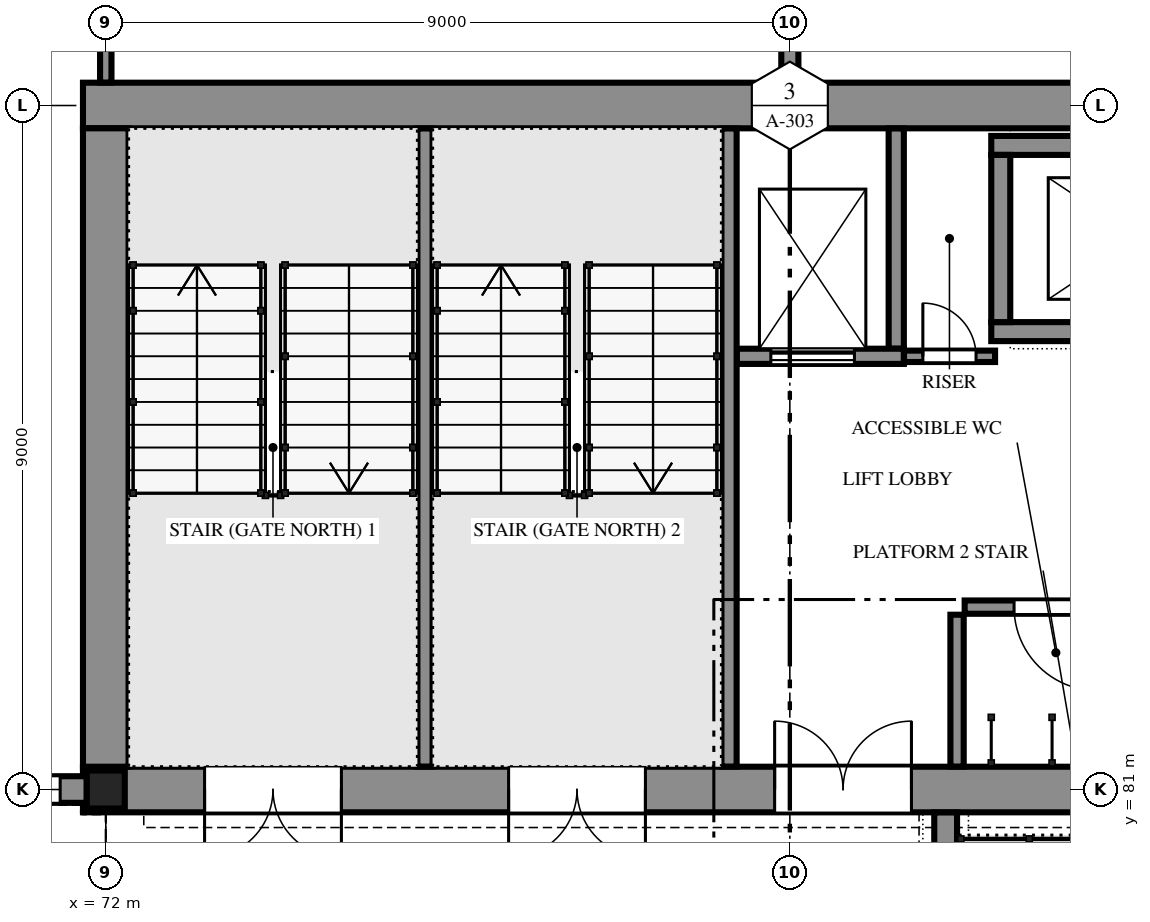
"""IFC4 building model, lengths in metres.
Left out: names, types, materials, properties, quantities, classifications, styles, units other than length and angle.
Written with IfcOpenShell. Run it as: python <this file> out.ifc"""

import sys

from ifc_helpers import new_model, si_unit, direction, frame, frame_2d, origin, origin_2d, place, context, subcontext, project, spatial, polyline, rectangle, hollow_rectangle, outline, extrude, element, fill, save


model = new_model("IFC4")
c1 = context("Model", 3, precision=1e-05, world=origin(), true_north=direction((0.0, 1.0)))
c2 = subcontext(c1, "Body", "Model", "MODEL_VIEW")
j1 = project(units=[si_unit("LENGTHUNIT", "METRE"), si_unit("PLANEANGLEUNIT", "RADIAN")], contexts=[c1])
p1 = place(None, origin())
s1 = spatial("IfcSite", under=j1, at=p1, CompositionType="ELEMENT")
p2 = place(p1, origin())
s2 = spatial("IfcBuilding", under=s1, at=p2, CompositionType="ELEMENT")
p3 = place(p2, origin())
s3 = spatial("IfcBuildingStorey", under=s2, at=p3, CompositionType="ELEMENT", Elevation=0.0)
p4 = place(p3, frame((72.0, 81.0, -2.1), z_axis=(0.0, 0.0, 1.0), x_axis=(1.0, 0.0, 0.0)))
e1 = element("IfcColumn", 1, at=p4, inside=s3, PredefinedType="COLUMN", context=c2, shape_type="SweptSolid", body=[
    extrude(hollow_rectangle(XDim=0.5, YDim=0.5, WallThickness=0.032, at=origin_2d()), origin(), (0.0, 0.0, 1.0), 9.6),
])
p5 = place(p3, frame((71.7, 81.0, -2.1), z_axis=(0.0, 0.0, 1.0), x_axis=(1.0, 0.0, 0.0)))
e2 = element("IfcWall", 2, at=p5, inside=s3, PredefinedType="SOLIDWALL", context=c2, shape_type="SweptSolid", body=[
    extrude(rectangle(XDim=18.6, YDim=0.6, at=frame_2d((9.3, 0.0))), origin(), (0.0, 0.0, 1.0), 9.6),
])
p6 = place(p5, frame((1.6, 0.0, 2.1)))
e3 = element("IfcOpeningElement", 3, at=p6, cuts=e2, PredefinedType="OPENING", context=c2, shape_type="SweptSolid", body=[
    extrude(rectangle(XDim=1.8, YDim=2.1, at=frame_2d((0.9, 1.05))), frame((0.0, 0.31, 0.0), z_axis=(0.0, -1.0, 0.0), x_axis=(1.0, 0.0, 0.0)), (0.0, 0.0, 1.0), 0.62),
])
p7 = place(p5, frame((5.6, 0.0, 2.1)))
e4 = element("IfcOpeningElement", 4, at=p7, cuts=e2, PredefinedType="OPENING", context=c2, shape_type="SweptSolid", body=[
    extrude(rectangle(XDim=1.8, YDim=2.1, at=frame_2d((0.9, 1.05))), frame((0.0, 0.31, 0.0), z_axis=(0.0, -1.0, 0.0), x_axis=(1.0, 0.0, 0.0)), (0.0, 0.0, 1.0), 0.62),
])
p8 = place(p5, frame((9.1, 0.0, 2.1)))
e5 = element("IfcOpeningElement", 5, at=p8, cuts=e2, PredefinedType="OPENING", context=c2, shape_type="SweptSolid", body=[
    extrude(rectangle(XDim=1.8, YDim=2.1, at=frame_2d((0.9, 1.05))), frame((0.0, 0.31, 0.0), z_axis=(0.0, -1.0, 0.0), x_axis=(1.0, 0.0, 0.0)), (0.0, 0.0, 1.0), 0.62),
])
p9 = place(p3, frame((71.7, 90.0, -2.1), z_axis=(0.0, 0.0, 1.0), x_axis=(1.0, 0.0, 0.0)))
e6 = element("IfcWall", 6, at=p9, inside=s3, PredefinedType="SOLIDWALL", context=c2, shape_type="SweptSolid", body=[
    extrude(rectangle(XDim=18.6, YDim=0.6, at=frame_2d((9.3, 0.0))), origin(), (0.0, 0.0, 1.0), 9.6),
])
p10 = place(p3, frame((72.0, 81.3, -2.1), z_axis=(0.0, 0.0, 1.0), x_axis=(0.0, 1.0, 0.0)))
e7 = element("IfcWall", 7, at=p10, inside=s3, PredefinedType="SOLIDWALL", context=c2, shape_type="SweptSolid", body=[
    extrude(rectangle(XDim=8.4, YDim=0.6, at=frame_2d((4.2, 0.0))), origin(), (0.0, 0.0, 1.0), 9.6),
])
p11 = place(p3, frame((63.154, 81.0, 0.0), z_axis=(0.0, 0.0, 1.0), x_axis=(1.0, 0.0, 0.0)))
e8 = element("IfcWall", 8, at=p11, inside=s3, PredefinedType="SOLIDWALL", context=c2, shape_type="SweptSolid", body=[
    extrude(rectangle(XDim=8.596, YDim=0.35, at=frame_2d((4.298, 0.0))), origin(), (0.0, 0.0, 1.0), 6.692),
])
p12 = place(p11, frame((0.446, 0.0, 0.9)))
e9 = element("IfcOpeningElement", 9, at=p12, cuts=e8, PredefinedType="OPENING", context=c2, shape_type="SweptSolid", body=[
    extrude(rectangle(XDim=1.8, YDim=3.6, at=frame_2d((0.9, 1.8))), frame((0.0, 0.185, 0.0), z_axis=(0.0, -1.0, 0.0), x_axis=(1.0, 0.0, 0.0)), (0.0, 0.0, 1.0), 0.37),
])
p13 = place(p11, frame((3.446, 0.0, 0.9)))
e10 = element("IfcOpeningElement", 10, at=p13, cuts=e8, PredefinedType="OPENING", context=c2, shape_type="SweptSolid", body=[
    extrude(rectangle(XDim=1.8, YDim=3.6, at=frame_2d((0.9, 1.8))), frame((0.0, 0.185, 0.0), z_axis=(0.0, -1.0, 0.0), x_axis=(1.0, 0.0, 0.0)), (0.0, 0.0, 1.0), 0.37),
])
p14 = place(p11, frame((6.446, 0.0, 0.9)))
e11 = element("IfcOpeningElement", 11, at=p14, cuts=e8, PredefinedType="OPENING", context=c2, shape_type="SweptSolid", body=[
    extrude(rectangle(XDim=1.8, YDim=3.6, at=frame_2d((0.9, 1.8))), frame((0.0, 0.185, 0.0), z_axis=(0.0, -1.0, 0.0), x_axis=(1.0, 0.0, 0.0)), (0.0, 0.0, 1.0), 0.37),
])
for number, where, z_axis, x_axis in (
    (12, (76.2, 81.302, 0.0), (0.0, 0.0, 1.0), (0.0, 1.0, 0.0)),
    (13, (80.2, 81.302, 0.0), (0.0, 0.0, 1.0), (0.0, 1.0, 0.0)),
):
    element("IfcWall", number, at=place(p3, frame(where, z_axis=z_axis, x_axis=x_axis)), inside=s3, PredefinedType="SOLIDWALL", context=c2, shape_type="SweptSolid", body=[
        extrude(rectangle(XDim=8.396, YDim=0.2, at=frame_2d((4.198, 0.0))), origin(), (0.0, 0.0, 1.0), 6.836),
    ])
p15 = place(p3, frame((83.05, 72.6, 0.0), z_axis=(0.0, 0.0, 1.0), x_axis=(0.0, 1.0, 0.0)))
e14 = element("IfcWall", 14, at=p15, inside=s3, PredefinedType="SOLIDWALL", context=c2, shape_type="SweptSolid", body=[
    extrude(rectangle(XDim=8.098, YDim=0.3, at=frame_2d((4.049, 0.0))), origin(), (0.0, 0.0, 1.0), 6.902),
])
p16 = place(p3, frame((80.302, 86.7, -1.6), z_axis=(0.0, 0.0, 1.0), x_axis=(1.0, 0.0, 0.0)))
e15 = element("IfcWall", 15, at=p16, inside=s3, PredefinedType="SOLIDWALL", context=c2, shape_type="SweptSolid", body=[
    extrude(rectangle(XDim=2.198, YDim=0.2, at=frame_2d((1.099, 0.0))), origin(), (0.0, 0.0, 1.0), 8.357),
])
p17 = place(p16, frame((0.448, 0.0, 1.6)))
e16 = element("IfcOpeningElement", 16, at=p17, cuts=e15, PredefinedType="OPENING", context=c2, shape_type="SweptSolid", body=[
    extrude(rectangle(XDim=1.1, YDim=2.1, at=frame_2d((0.55, 1.05))), frame((0.0, 0.11, 0.0), z_axis=(0.0, -1.0, 0.0), x_axis=(1.0, 0.0, 0.0)), (0.0, 0.0, 1.0), 0.22),
])
p18 = place(p3, frame((82.4, 86.8, -1.6), z_axis=(0.0, 0.0, 1.0), x_axis=(0.0, 1.0, 0.0)))
e17 = element("IfcWall", 17, at=p18, inside=s3, PredefinedType="SOLIDWALL", context=c2, shape_type="SweptSolid", body=[
    extrude(rectangle(XDim=2.898, YDim=0.2, at=frame_2d((1.449, 0.0))), origin(), (0.0, 0.0, 1.0), 8.357),
])
for number, where, z_axis, x_axis in (
    (18, (83.65, 87.025, -1.6), (0.0, 0.0, 1.0), (1.0, 0.0, 0.0)),
    (19, (83.65, 89.475, -1.6), (0.0, 0.0, 1.0), (1.0, 0.0, 0.0)),
):
    element("IfcWall", number, at=place(p3, frame(where, z_axis=z_axis, x_axis=x_axis)), inside=s3, PredefinedType="SOLIDWALL", context=c2, shape_type="SweptSolid", body=[
        extrude(rectangle(XDim=3.4, YDim=0.25, at=frame_2d((1.7, 0.0))), origin(), (0.0, 0.0, 1.0), 8.436),
    ])
p19 = place(p3, frame((83.775, 87.15, -1.6), z_axis=(0.0, 0.0, 1.0), x_axis=(0.0, 1.0, 0.0)))
e20 = element("IfcWall", 20, at=p19, inside=s3, PredefinedType="SOLIDWALL", context=c2, shape_type="SweptSolid", body=[
    extrude(rectangle(XDim=2.2, YDim=0.25, at=frame_2d((1.1, 0.0))), origin(), (0.0, 0.0, 1.0), 8.436),
])
p20 = place(p3, frame((72.0, 95.938, 0.0), z_axis=(0.0, 0.0, 1.0), x_axis=(0.0, -1.0, 0.0)))
e21 = element("IfcWall", 21, at=p20, inside=s3, PredefinedType="PARTITIONING", context=c2, shape_type="SweptSolid", body=[
    extrude(rectangle(XDim=5.635, YDim=0.15, at=frame_2d((2.818, 0.0))), origin(), (0.0, 0.0, 1.0), 6.6),
])
p21 = place(p3, frame((81.0, 95.887, 0.0), z_axis=(0.0, 0.0, 1.0), x_axis=(0.0, -1.0, 0.0)))
e22 = element("IfcWall", 22, at=p21, inside=s3, PredefinedType="PARTITIONING", context=c2, shape_type="SweptSolid", body=[
    extrude(rectangle(XDim=5.585, YDim=0.225, at=frame_2d((2.793, 0.0))), origin(), (0.0, 0.0, 1.0), 6.6),
])
p22 = place(p3, frame((85.7, 83.4, 0.0), z_axis=(0.0, 0.0, 1.0), x_axis=(-1.0, 0.0, 0.0)))
e23 = element("IfcWall", 23, at=p22, inside=s3, PredefinedType="PARTITIONING", context=c2, shape_type="SweptSolid", body=[
    extrude(rectangle(XDim=2.4, YDim=0.175, at=frame_2d((1.2, 0.0))), origin(), (0.0, 0.0, 1.0), 6.459),
])
p23 = place(p22, frame((0.65, 0.0, 0.0)))
e24 = element("IfcOpeningElement", 24, at=p23, cuts=e23, PredefinedType="OPENING", context=c2, shape_type="SweptSolid", body=[
    extrude(rectangle(XDim=1.1, YDim=2.1, at=frame_2d((0.55, 1.05))), frame((0.0, 0.097, 0.0), z_axis=(0.0, -1.0, 0.0), x_axis=(1.0, 0.0, 0.0)), (0.0, 0.0, 1.0), 0.195),
])
p24 = place(p3, frame((83.2, 83.3, 0.0), z_axis=(0.0, 0.0, 1.0), x_axis=(0.0, -1.0, 0.0)))
e25 = element("IfcWall", 25, at=p24, inside=s3, PredefinedType="PARTITIONING", context=c2, shape_type="SweptSolid", body=[
    extrude(rectangle(XDim=1.998, YDim=0.175, at=frame_2d((0.999, 0.0))), origin(), (0.0, 0.0, 1.0), 6.459),
])
p25 = place(p3, frame((82.502, 86.7, 0.0), z_axis=(0.0, 0.0, 1.0), x_axis=(1.0, 0.0, 0.0)))
e26 = element("IfcWall", 26, at=p25, inside=s3, PredefinedType="SOLIDWALL", context=c2, shape_type="SweptSolid", body=[
    extrude(rectangle(XDim=1.198, YDim=0.15, at=frame_2d((0.599, 0.0))), origin(), (0.0, 0.0, 1.0), 6.836),
])
p26 = place(p25, frame((0.248, 0.0, 0.0)))
e27 = element("IfcOpeningElement", 27, at=p26, cuts=e26, PredefinedType="OPENING", context=c2, shape_type="SweptSolid", body=[
    extrude(rectangle(XDim=0.7, YDim=2.0, at=frame_2d((0.35, 1.0))), frame((0.0, 0.085, 0.0), z_axis=(0.0, -1.0, 0.0), x_axis=(1.0, 0.0, 0.0)), (0.0, 0.0, 1.0), 0.17),
])
p27 = place(p14, origin())
e28 = element("IfcWindow", 28, at=p27, inside=s3, PartitioningType="TRIPLE_PANEL_HORIZONTAL", PredefinedType="WINDOW", context=c2, shape_type="SweptSolid", body=[
    extrude(outline(polyline([(0.0, 0.0), (1.8, 0.0), (1.8, 3.6), (0.0, 3.6), (0.0, 0.0)]), holes=[polyline([(0.07, 0.07), (1.73, 0.07), (1.73, 3.53), (0.07, 3.53), (0.07, 0.07)])]), frame((0.0, 0.03, 0.0), z_axis=(0.0, -1.0, 0.0), x_axis=(1.0, 0.0, 0.0)), (0.0, 0.0, 1.0), 0.06),
    extrude(rectangle(XDim=1.66, YDim=0.04, at=frame_2d((0.9, 1.217))), frame((0.0, 0.021, 0.0), z_axis=(0.0, -1.0, 0.0), x_axis=(1.0, 0.0, 0.0)), (0.0, 0.0, 1.0), 0.043),
    extrude(rectangle(XDim=1.66, YDim=0.04, at=frame_2d((0.9, 2.383))), frame((0.0, 0.021, 0.0), z_axis=(0.0, -1.0, 0.0), x_axis=(1.0, 0.0, 0.0)), (0.0, 0.0, 1.0), 0.043),
    extrude(outline(polyline([(0.07, 0.07), (1.73, 0.07), (1.73, 1.197), (0.07, 1.197), (0.07, 0.07)]), holes=[polyline([(0.1, 0.1), (1.7, 0.1), (1.7, 1.167), (0.1, 1.167), (0.1, 0.1)])]), frame((0.0, 0.022, 0.0), z_axis=(0.0, -1.0, 0.0), x_axis=(1.0, 0.0, 0.0)), (0.0, 0.0, 1.0), 0.045),
    extrude(rectangle(XDim=1.6, YDim=1.067, at=frame_2d((0.9, 0.633))), frame((0.0, 0.006, 0.0), z_axis=(0.0, -1.0, 0.0), x_axis=(1.0, 0.0, 0.0)), (0.0, 0.0, 1.0), 0.012),
    extrude(outline(polyline([(0.07, 1.237), (1.73, 1.237), (1.73, 2.363), (0.07, 2.363), (0.07, 1.237)]), holes=[polyline([(0.1, 1.267), (1.7, 1.267), (1.7, 2.333), (0.1, 2.333), (0.1, 1.267)])]), frame((0.0, 0.022, 0.0), z_axis=(0.0, -1.0, 0.0), x_axis=(1.0, 0.0, 0.0)), (0.0, 0.0, 1.0), 0.045),
    extrude(rectangle(XDim=1.6, YDim=1.066, at=frame_2d((0.9, 1.8))), frame((0.0, 0.006, 0.0), z_axis=(0.0, -1.0, 0.0), x_axis=(1.0, 0.0, 0.0)), (0.0, 0.0, 1.0), 0.012),
    extrude(outline(polyline([(0.07, 2.403), (1.73, 2.403), (1.73, 3.53), (0.07, 3.53), (0.07, 2.403)]), holes=[polyline([(0.1, 2.433), (1.7, 2.433), (1.7, 3.5), (0.1, 3.5), (0.1, 2.433)])]), frame((0.0, 0.022, 0.0), z_axis=(0.0, -1.0, 0.0), x_axis=(1.0, 0.0, 0.0)), (0.0, 0.0, 1.0), 0.045),
    extrude(rectangle(XDim=1.6, YDim=1.067, at=frame_2d((0.9, 2.967))), frame((0.0, 0.006, 0.0), z_axis=(0.0, -1.0, 0.0), x_axis=(1.0, 0.0, 0.0)), (0.0, 0.0, 1.0), 0.012),
])
fill(e11, e28)
p28 = place(p17, origin())
e29 = element("IfcDoor", 29, at=p28, inside=s3, OperationType="SLIDING_TO_LEFT", PredefinedType="DOOR", context=c2, shape_type="SweptSolid", body=[
    extrude(outline(polyline([(0.0, 0.0), (0.07, 0.0), (0.07, 2.03), (1.03, 2.03), (1.03, 0.0), (1.1, 0.0), (1.1, 2.1), (0.0, 2.1), (0.0, 0.0)])), frame((0.0, 0.025, 0.0), z_axis=(0.0, -1.0, 0.0), x_axis=(1.0, 0.0, 0.0)), (0.0, 0.0, 1.0), 0.05),
    extrude(rectangle(XDim=0.524, YDim=2.016, at=frame_2d((0.336, 1.018))), frame((0.0, 0.018, 0.0), z_axis=(0.0, -1.0, 0.0), x_axis=(1.0, 0.0, 0.0)), (0.0, 0.0, 1.0), 0.016),
    extrude(rectangle(XDim=0.52, YDim=2.016, at=frame_2d((0.766, 1.018))), frame((0.0, -0.002, 0.0), z_axis=(0.0, -1.0, 0.0), x_axis=(1.0, 0.0, 0.0)), (0.0, 0.0, 1.0), 0.016),
])
fill(e16, e29)
p29 = place(p6, frame((1.8, 0.0, 0.0), z_axis=(0.0, 0.0, 1.0), x_axis=(-1.0, 0.0, 0.0)))
e30 = element("IfcDoor", 30, at=p29, inside=s3, OperationType="DOUBLE_DOOR_SINGLE_SWING", PredefinedType="DOOR", context=c2, shape_type="SweptSolid", body=[
    extrude(outline(polyline([(0.0, 0.0), (0.07, 0.0), (0.07, 2.03), (1.73, 2.03), (1.73, 0.0), (1.8, 0.0), (1.8, 2.1), (0.0, 2.1), (0.0, 0.0)])), frame((0.0, 0.025, 0.0), z_axis=(0.0, -1.0, 0.0), x_axis=(1.0, 0.0, 0.0)), (0.0, 0.0, 1.0), 0.05),
    extrude(outline(polyline([(0.074, 0.01), (0.897, 0.01), (0.897, 2.026), (0.074, 2.026), (0.074, 0.01)]), holes=[polyline([(0.194, 0.16), (0.777, 0.16), (0.777, 1.01), (0.194, 1.01), (0.194, 0.16)]), polyline([(0.335, 1.16), (0.635, 1.16), (0.635, 1.76), (0.335, 1.76), (0.335, 1.16)])]), frame((0.0, 0.017, 0.0), z_axis=(0.0, -1.0, 0.0), x_axis=(1.0, 0.0, 0.0)), (0.0, 0.0, 1.0), 0.035),
    extrude(rectangle(XDim=0.583, YDim=0.85, at=frame_2d((0.485, 0.585))), frame((0.0, 0.009, 0.0), z_axis=(0.0, -1.0, 0.0), x_axis=(1.0, 0.0, 0.0)), (0.0, 0.0, 1.0), 0.017),
    extrude(rectangle(XDim=0.3, YDim=0.6, at=frame_2d((0.485, 1.46))), frame((0.0, 0.006, 0.0), z_axis=(0.0, -1.0, 0.0), x_axis=(1.0, 0.0, 0.0)), (0.0, 0.0, 1.0), 0.012),
    extrude(outline(polyline([(0.903, 0.01), (1.726, 0.01), (1.726, 2.026), (0.903, 2.026), (0.903, 0.01)]), holes=[polyline([(1.023, 0.16), (1.606, 0.16), (1.606, 1.01), (1.023, 1.01), (1.023, 0.16)]), polyline([(1.165, 1.16), (1.465, 1.16), (1.465, 1.76), (1.165, 1.76), (1.165, 1.16)])]), frame((0.0, 0.017, 0.0), z_axis=(0.0, -1.0, 0.0), x_axis=(1.0, 0.0, 0.0)), (0.0, 0.0, 1.0), 0.035),
    extrude(rectangle(XDim=0.583, YDim=0.85, at=frame_2d((1.314, 0.585))), frame((0.0, 0.009, 0.0), z_axis=(0.0, -1.0, 0.0), x_axis=(1.0, 0.0, 0.0)), (0.0, 0.0, 1.0), 0.017),
    extrude(rectangle(XDim=0.3, YDim=0.6, at=frame_2d((1.314, 1.46))), frame((0.0, 0.006, 0.0), z_axis=(0.0, -1.0, 0.0), x_axis=(1.0, 0.0, 0.0)), (0.0, 0.0, 1.0), 0.012),
])
fill(e3, e30)
p30 = place(p7, frame((1.8, 0.0, 0.0), z_axis=(0.0, 0.0, 1.0), x_axis=(-1.0, 0.0, 0.0)))
e31 = element("IfcDoor", 31, at=p30, inside=s3, OperationType="DOUBLE_DOOR_SINGLE_SWING", PredefinedType="DOOR", context=c2, shape_type="SweptSolid", body=[
    extrude(outline(polyline([(0.0, 0.0), (0.07, 0.0), (0.07, 2.03), (1.73, 2.03), (1.73, 0.0), (1.8, 0.0), (1.8, 2.1), (0.0, 2.1), (0.0, 0.0)])), frame((0.0, 0.025, 0.0), z_axis=(0.0, -1.0, 0.0), x_axis=(1.0, 0.0, 0.0)), (0.0, 0.0, 1.0), 0.05),
    extrude(outline(polyline([(0.074, 0.01), (0.897, 0.01), (0.897, 2.026), (0.074, 2.026), (0.074, 0.01)]), holes=[polyline([(0.194, 0.16), (0.777, 0.16), (0.777, 1.01), (0.194, 1.01), (0.194, 0.16)]), polyline([(0.335, 1.16), (0.635, 1.16), (0.635, 1.76), (0.335, 1.76), (0.335, 1.16)])]), frame((0.0, 0.017, 0.0), z_axis=(0.0, -1.0, 0.0), x_axis=(1.0, 0.0, 0.0)), (0.0, 0.0, 1.0), 0.035),
    extrude(rectangle(XDim=0.583, YDim=0.85, at=frame_2d((0.485, 0.585))), frame((0.0, 0.009, 0.0), z_axis=(0.0, -1.0, 0.0), x_axis=(1.0, 0.0, 0.0)), (0.0, 0.0, 1.0), 0.017),
    extrude(rectangle(XDim=0.3, YDim=0.6, at=frame_2d((0.485, 1.46))), frame((0.0, 0.006, 0.0), z_axis=(0.0, -1.0, 0.0), x_axis=(1.0, 0.0, 0.0)), (0.0, 0.0, 1.0), 0.012),
    extrude(outline(polyline([(0.903, 0.01), (1.726, 0.01), (1.726, 2.026), (0.903, 2.026), (0.903, 0.01)]), holes=[polyline([(1.023, 0.16), (1.606, 0.16), (1.606, 1.01), (1.023, 1.01), (1.023, 0.16)]), polyline([(1.165, 1.16), (1.465, 1.16), (1.465, 1.76), (1.165, 1.76), (1.165, 1.16)])]), frame((0.0, 0.017, 0.0), z_axis=(0.0, -1.0, 0.0), x_axis=(1.0, 0.0, 0.0)), (0.0, 0.0, 1.0), 0.035),
    extrude(rectangle(XDim=0.583, YDim=0.85, at=frame_2d((1.314, 0.585))), frame((0.0, 0.009, 0.0), z_axis=(0.0, -1.0, 0.0), x_axis=(1.0, 0.0, 0.0)), (0.0, 0.0, 1.0), 0.017),
    extrude(rectangle(XDim=0.3, YDim=0.6, at=frame_2d((1.314, 1.46))), frame((0.0, 0.006, 0.0), z_axis=(0.0, -1.0, 0.0), x_axis=(1.0, 0.0, 0.0)), (0.0, 0.0, 1.0), 0.012),
])
fill(e4, e31)
p31 = place(p8, origin())
e32 = element("IfcDoor", 32, at=p31, inside=s3, OperationType="DOUBLE_DOOR_SINGLE_SWING", PredefinedType="DOOR", context=c2, shape_type="SweptSolid", body=[
    extrude(outline(polyline([(0.0, 0.0), (0.07, 0.0), (0.07, 2.03), (1.73, 2.03), (1.73, 0.0), (1.8, 0.0), (1.8, 2.1), (0.0, 2.1), (0.0, 0.0)])), frame((0.0, 0.025, 0.0), z_axis=(0.0, -1.0, 0.0), x_axis=(1.0, 0.0, 0.0)), (0.0, 0.0, 1.0), 0.05),
    extrude(outline(polyline([(0.074, 0.01), (0.897, 0.01), (0.897, 2.026), (0.074, 2.026), (0.074, 0.01)]), holes=[polyline([(0.194, 0.16), (0.777, 0.16), (0.777, 1.01), (0.194, 1.01), (0.194, 0.16)]), polyline([(0.335, 1.16), (0.635, 1.16), (0.635, 1.76), (0.335, 1.76), (0.335, 1.16)])]), frame((0.0, 0.017, 0.0), z_axis=(0.0, -1.0, 0.0), x_axis=(1.0, 0.0, 0.0)), (0.0, 0.0, 1.0), 0.035),
    extrude(rectangle(XDim=0.583, YDim=0.85, at=frame_2d((0.485, 0.585))), frame((0.0, 0.009, 0.0), z_axis=(0.0, -1.0, 0.0), x_axis=(1.0, 0.0, 0.0)), (0.0, 0.0, 1.0), 0.017),
    extrude(rectangle(XDim=0.3, YDim=0.6, at=frame_2d((0.485, 1.46))), frame((0.0, 0.006, 0.0), z_axis=(0.0, -1.0, 0.0), x_axis=(1.0, 0.0, 0.0)), (0.0, 0.0, 1.0), 0.012),
    extrude(outline(polyline([(0.903, 0.01), (1.726, 0.01), (1.726, 2.026), (0.903, 2.026), (0.903, 0.01)]), holes=[polyline([(1.023, 0.16), (1.606, 0.16), (1.606, 1.01), (1.023, 1.01), (1.023, 0.16)]), polyline([(1.165, 1.16), (1.465, 1.16), (1.465, 1.76), (1.165, 1.76), (1.165, 1.16)])]), frame((0.0, 0.017, 0.0), z_axis=(0.0, -1.0, 0.0), x_axis=(1.0, 0.0, 0.0)), (0.0, 0.0, 1.0), 0.035),
    extrude(rectangle(XDim=0.583, YDim=0.85, at=frame_2d((1.314, 0.585))), frame((0.0, 0.009, 0.0), z_axis=(0.0, -1.0, 0.0), x_axis=(1.0, 0.0, 0.0)), (0.0, 0.0, 1.0), 0.017),
    extrude(rectangle(XDim=0.3, YDim=0.6, at=frame_2d((1.314, 1.46))), frame((0.0, 0.006, 0.0), z_axis=(0.0, -1.0, 0.0), x_axis=(1.0, 0.0, 0.0)), (0.0, 0.0, 1.0), 0.012),
])
fill(e5, e32)
p32 = place(p26, origin())
e33 = element("IfcDoor", 33, at=p32, inside=s3, OperationType="SINGLE_SWING_LEFT", PredefinedType="DOOR", context=c2, shape_type="SweptSolid", body=[
    extrude(outline(polyline([(0.0, 0.0), (0.07, 0.0), (0.07, 1.93), (0.63, 1.93), (0.63, 0.0), (0.7, 0.0), (0.7, 2.0), (0.0, 2.0), (0.0, 0.0)])), frame((0.0, 0.025, 0.0), z_axis=(0.0, -1.0, 0.0), x_axis=(1.0, 0.0, 0.0)), (0.0, 0.0, 1.0), 0.05),
    extrude(outline(polyline([(0.074, 0.01), (0.626, 0.01), (0.626, 1.926), (0.074, 1.926), (0.074, 0.01)]), holes=[polyline([(0.184, 0.16), (0.516, 0.16), (0.516, 1.01), (0.184, 1.01), (0.184, 0.16)]), polyline([(0.2, 1.16), (0.5, 1.16), (0.5, 1.76), (0.2, 1.76), (0.2, 1.16)])]), frame((0.0, 0.017, 0.0), z_axis=(0.0, -1.0, 0.0), x_axis=(1.0, 0.0, 0.0)), (0.0, 0.0, 1.0), 0.035),
    extrude(rectangle(XDim=0.331, YDim=0.85, at=frame_2d((0.35, 0.585))), frame((0.0, 0.009, 0.0), z_axis=(0.0, -1.0, 0.0), x_axis=(1.0, 0.0, 0.0)), (0.0, 0.0, 1.0), 0.017),
    extrude(rectangle(XDim=0.3, YDim=0.6, at=frame_2d((0.35, 1.46))), frame((0.0, 0.006, 0.0), z_axis=(0.0, -1.0, 0.0), x_axis=(1.0, 0.0, 0.0)), (0.0, 0.0, 1.0), 0.012),
])
fill(e27, e33)
p33 = place(p23, origin())
e34 = element("IfcDoor", 34, at=p33, inside=s3, OperationType="SINGLE_SWING_LEFT", PredefinedType="DOOR", context=c2, shape_type="SweptSolid", body=[
    extrude(outline(polyline([(0.0, 0.0), (0.07, 0.0), (0.07, 2.03), (1.03, 2.03), (1.03, 0.0), (1.1, 0.0), (1.1, 2.1), (0.0, 2.1), (0.0, 0.0)])), frame((0.0, 0.025, 0.0), z_axis=(0.0, -1.0, 0.0), x_axis=(1.0, 0.0, 0.0)), (0.0, 0.0, 1.0), 0.05),
    extrude(outline(polyline([(0.074, 0.01), (1.026, 0.01), (1.026, 2.026), (0.074, 2.026), (0.074, 0.01)]), holes=[polyline([(0.194, 0.16), (0.906, 0.16), (0.906, 1.01), (0.194, 1.01), (0.194, 0.16)]), polyline([(0.4, 1.16), (0.7, 1.16), (0.7, 1.76), (0.4, 1.76), (0.4, 1.16)])]), frame((0.0, 0.017, 0.0), z_axis=(0.0, -1.0, 0.0), x_axis=(1.0, 0.0, 0.0)), (0.0, 0.0, 1.0), 0.035),
    extrude(rectangle(XDim=0.712, YDim=0.85, at=frame_2d((0.55, 0.585))), frame((0.0, 0.009, 0.0), z_axis=(0.0, -1.0, 0.0), x_axis=(1.0, 0.0, 0.0)), (0.0, 0.0, 1.0), 0.017),
    extrude(rectangle(XDim=0.3, YDim=0.6, at=frame_2d((0.55, 1.46))), frame((0.0, 0.006, 0.0), z_axis=(0.0, -1.0, 0.0), x_axis=(1.0, 0.0, 0.0)), (0.0, 0.0, 1.0), 0.012),
])
fill(e24, e34)
save(model, sys.argv[1])
